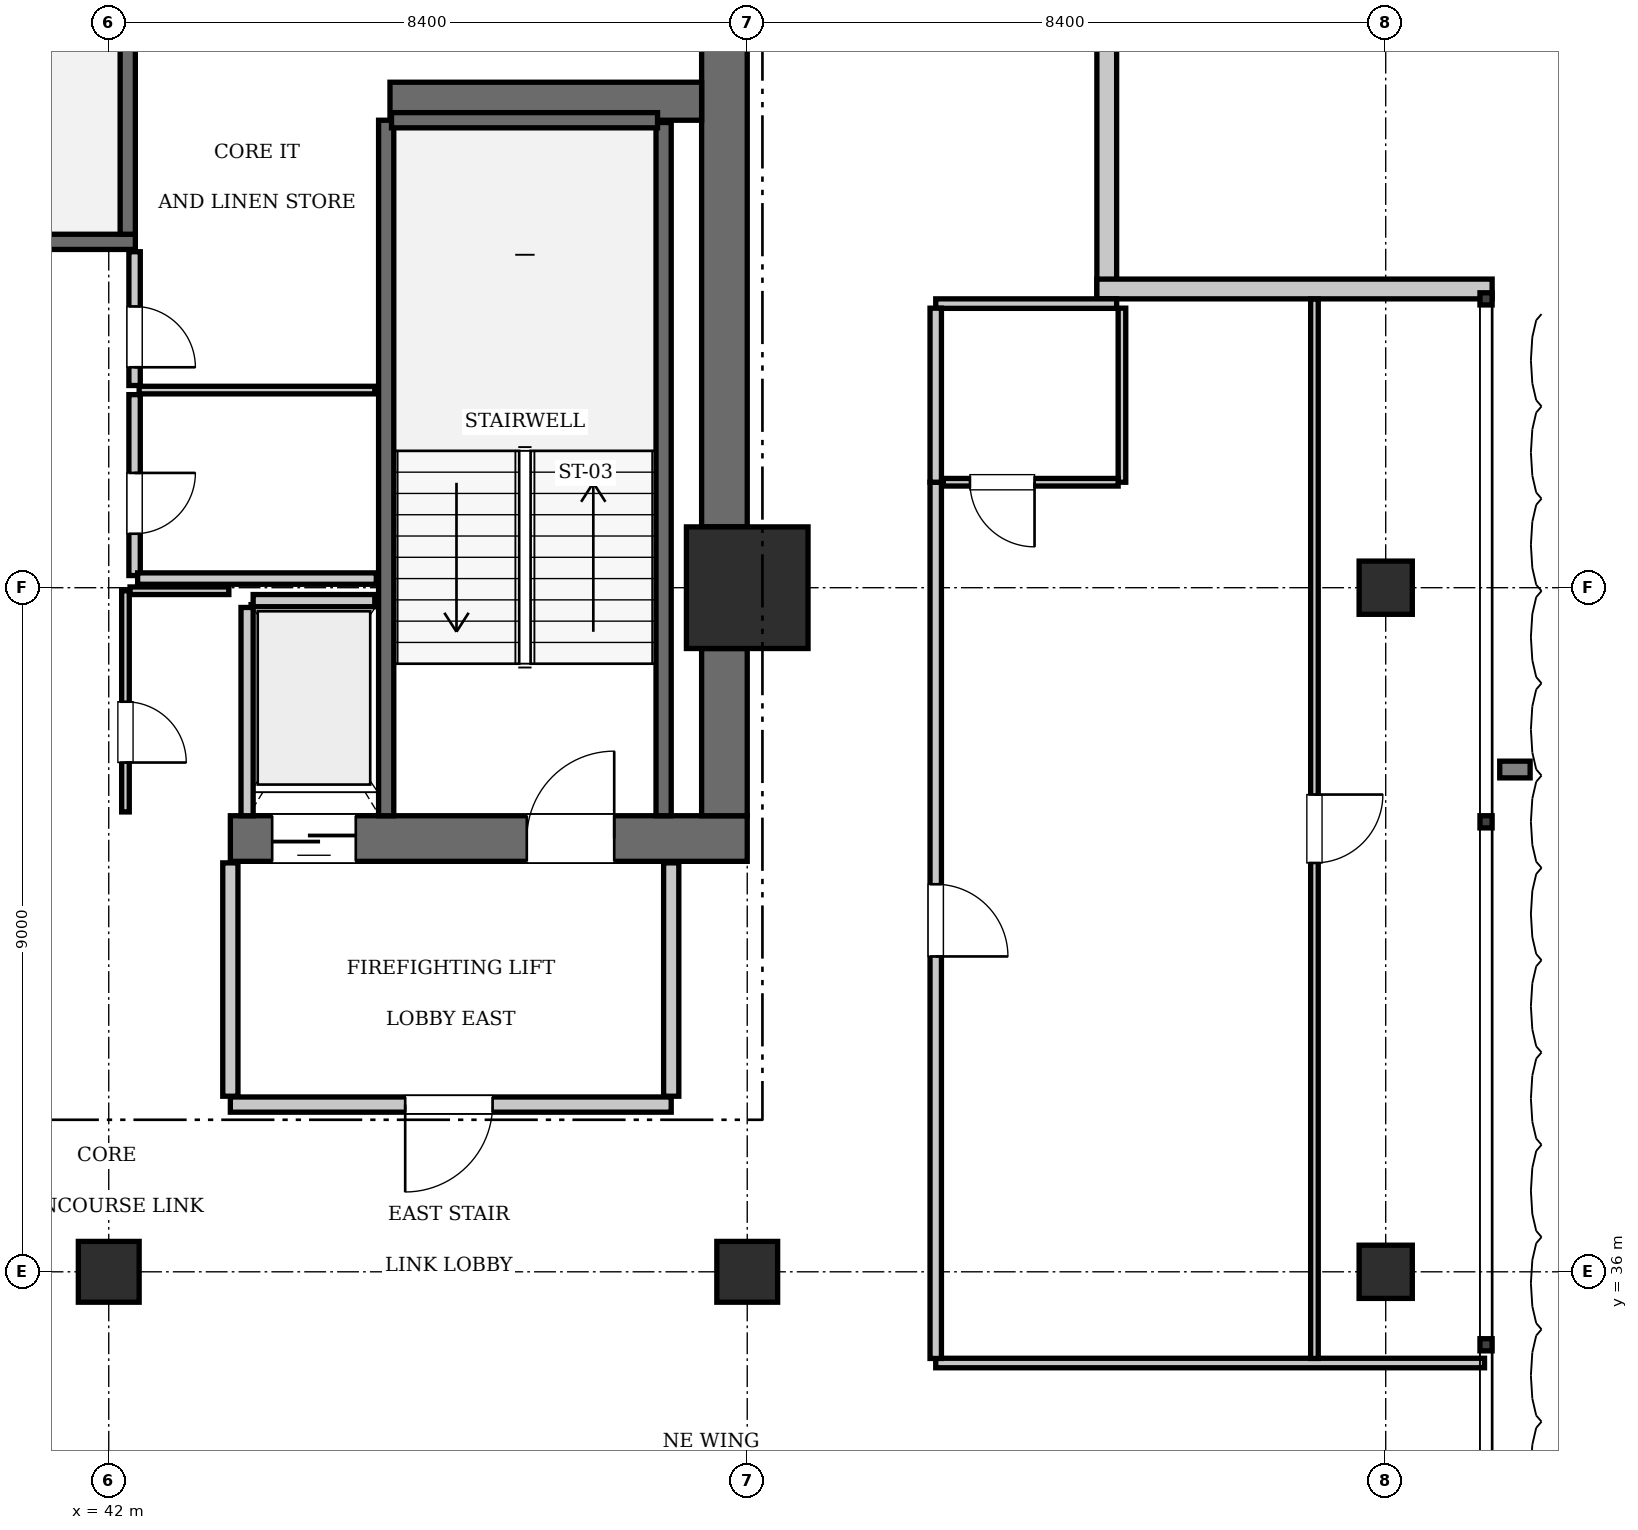
"""IFC4 building model, lengths in metres.
Left out: names, types, materials, properties, quantities, classifications, styles, units other than length and angle.
Written with IfcOpenShell. Run it as: python <this file> out.ifc"""

import sys

from ifc_helpers import new_model, si_unit, direction, frame, frame_2d, origin, origin_2d, place, context, subcontext, project, spatial, rectangle, extrude, element, fill, save


model = new_model("IFC4")
c1 = context("Model", 3, precision=1e-05, world=origin(), true_north=direction((0.0, 1.0)))
c2 = subcontext(c1, "Body", "Model", "MODEL_VIEW")
j1 = project(units=[si_unit("LENGTHUNIT", "METRE"), si_unit("PLANEANGLEUNIT", "RADIAN")], contexts=[c1])
p1 = place(None, origin())
s1 = spatial("IfcSite", under=j1, at=p1, CompositionType="ELEMENT")
p2 = place(p1, origin())
s2 = spatial("IfcBuilding", under=s1, at=p2, CompositionType="ELEMENT")
p3 = place(p2, frame((0.0, 0.0, 277.9)))
s3 = spatial("IfcBuildingStorey", under=s2, at=p3, CompositionType="ELEMENT", Elevation=277.9)
p4 = place(p3, frame((50.4, 45.0, 0.0), z_axis=(0.0, 0.0, 1.0), x_axis=(1.0, 0.0, 0.0)))
e1 = element("IfcColumn", 1, at=p4, inside=s3, PredefinedType="COLUMN", context=c2, shape_type="SweptSolid", body=[
    extrude(rectangle(XDim=1.6, YDim=1.6, at=origin_2d()), origin(), (0.0, 0.0, 1.0), 3.85),
])
p5 = place(p3, frame((43.6, 41.7, 0.0), z_axis=(0.0, 0.0, 1.0), x_axis=(1.0, 0.0, 0.0)))
e2 = element("IfcWall", 2, at=p5, inside=s3, PredefinedType="SHEAR", context=c2, shape_type="SweptSolid", body=[
    extrude(rectangle(XDim=6.8, YDim=0.6, at=frame_2d((3.4, 0.0))), origin(), (0.0, 0.0, 1.0), 3.85),
])
p6 = place(p5, frame((3.9, 0.0, 0.0)))
e3 = element("IfcOpeningElement", 3, at=p6, cuts=e2, PredefinedType="OPENING", context=c2, shape_type="SweptSolid", body=[
    extrude(rectangle(XDim=1.15, YDim=2.15, at=frame_2d((0.575, 1.075))), frame((0.0, 0.31, 0.0), z_axis=(0.0, -1.0, 0.0), x_axis=(1.0, 0.0, 0.0)), (0.0, 0.0, 1.0), 0.62),
])
p7 = place(p5, frame((0.55, 0.0, 0.0)))
e4 = element("IfcOpeningElement", 4, at=p7, cuts=e2, PredefinedType="OPENING", context=c2, shape_type="SweptSolid", body=[
    extrude(rectangle(XDim=1.1, YDim=2.2, at=frame_2d((0.55, 1.1))), frame((0.0, 0.31, 0.0), z_axis=(0.0, -1.0, 0.0), x_axis=(1.0, 0.0, 0.0)), (0.0, 0.0, 1.0), 0.62),
])
p8 = place(p3, frame((50.1, 42.0, 0.0), z_axis=(0.0, 0.0, 1.0), x_axis=(0.0, 1.0, 0.0)))
e5 = element("IfcWall", 5, at=p8, inside=s3, PredefinedType="SHEAR", context=c2, shape_type="SweptSolid", body=[
    extrude(rectangle(XDim=2.2, YDim=0.6, at=frame_2d((1.1, 0.0))), origin(), (0.0, 0.0, 1.0), 3.85),
])
p9 = place(p3, frame((50.1, 45.8, 0.0), z_axis=(0.0, 0.0, 1.0), x_axis=(0.0, 1.0, 0.0)))
e6 = element("IfcWall", 6, at=p9, inside=s3, PredefinedType="SHEAR", context=c2, shape_type="SweptSolid", body=[
    extrude(rectangle(XDim=7.6, YDim=0.6, at=frame_2d((3.8, 0.0))), origin(), (0.0, 0.0, 1.0), 3.85),
])
p10 = place(p3, frame((45.7, 51.4, 0.0), z_axis=(0.0, 0.0, 1.0), x_axis=(1.0, 0.0, 0.0)))
e7 = element("IfcWall", 7, at=p10, inside=s3, PredefinedType="SHEAR", context=c2, shape_type="SweptSolid", body=[
    extrude(rectangle(XDim=4.1, YDim=0.5, at=frame_2d((2.05, 0.0))), origin(), (0.0, 0.0, 1.0), 3.85),
])
for number, where, z_axis, x_axis in (
    (8, (42.0, 36.0, 0.0), (0.0, 0.0, 1.0), (1.0, 0.0, 0.0)),
    (9, (50.4, 36.0, 0.0), (0.0, 0.0, 1.0), (1.0, 0.0, 0.0)),
):
    element("IfcColumn", number, at=place(p3, frame(where, z_axis=z_axis, x_axis=x_axis)), inside=s3, PredefinedType="COLUMN", context=c2, shape_type="SweptSolid", body=[
        extrude(rectangle(XDim=0.8, YDim=0.8, at=origin_2d()), origin(), (0.0, 0.0, 1.0), 3.85),
    ])
for number, where, z_axis, x_axis in (
    (10, (58.8, 36.0, 0.0), (0.0, 0.0, 1.0), (1.0, 0.0, 0.0)),
    (11, (58.8, 45.0, 0.0), (0.0, 0.0, 1.0), (1.0, 0.0, 0.0)),
):
    element("IfcColumn", number, at=place(p3, frame(where, z_axis=z_axis, x_axis=x_axis)), inside=s3, PredefinedType="COLUMN", context=c2, shape_type="SweptSolid", body=[
        extrude(rectangle(XDim=0.7, YDim=0.7, at=origin_2d()), origin(), (0.0, 0.0, 1.0), 3.85),
    ])
p11 = place(p3, frame((33.25, 49.55, 0.0), z_axis=(0.0, 0.0, 1.0), x_axis=(1.0, 0.0, 0.0)))
e12 = element("IfcWall", 12, at=p11, inside=s3, PredefinedType="SOLIDWALL", context=c2, shape_type="SweptSolid", body=[
    extrude(rectangle(XDim=9.1, YDim=0.2, at=frame_2d((4.55, 0.0))), origin(), (0.0, 0.0, 1.0), 3.61),
])
p12 = place(p3, frame((42.25, 49.65, 0.0), z_axis=(0.0, 0.0, 1.0), x_axis=(0.0, 1.0, 0.0)))
e13 = element("IfcWall", 13, at=p12, inside=s3, PredefinedType="SOLIDWALL", context=c2, shape_type="SweptSolid", body=[
    extrude(rectangle(XDim=3.75, YDim=0.2, at=frame_2d((1.875, 0.0))), origin(), (0.0, 0.0, 1.0), 3.61),
])
p13 = place(p3, frame((45.65, 42.0, 0.0), z_axis=(0.0, 0.0, 1.0), x_axis=(0.0, 1.0, 0.0)))
e14 = element("IfcWall", 14, at=p13, inside=s3, PredefinedType="SOLIDWALL", context=c2, shape_type="SweptSolid", body=[
    extrude(rectangle(XDim=9.15, YDim=0.2, at=frame_2d((4.575, 0.0))), origin(), (0.0, 0.0, 1.0), 3.61),
])
p14 = place(p3, frame((49.3, 42.0, 0.0), z_axis=(0.0, 0.0, 1.0), x_axis=(0.0, 1.0, 0.0)))
e15 = element("IfcWall", 15, at=p14, inside=s3, PredefinedType="SOLIDWALL", context=c2, shape_type="SweptSolid", body=[
    extrude(rectangle(XDim=9.12, YDim=0.2, at=frame_2d((4.56, 0.0))), origin(), (0.0, 0.0, 1.0), 3.61),
])
p15 = place(p3, frame((45.72, 51.15, 0.0), z_axis=(0.0, 0.0, 1.0), x_axis=(1.0, 0.0, 0.0)))
e16 = element("IfcWall", 16, at=p15, inside=s3, PredefinedType="SOLIDWALL", context=c2, shape_type="SweptSolid", body=[
    extrude(rectangle(XDim=3.5, YDim=0.2, at=frame_2d((1.75, 0.0))), origin(), (0.0, 0.0, 1.0), 3.61),
])
p16 = place(p3, frame((43.9, 44.83, 0.0), z_axis=(0.0, 0.0, 1.0), x_axis=(1.0, 0.0, 0.0)))
e17 = element("IfcWall", 17, at=p16, inside=s3, PredefinedType="SOLIDWALL", context=c2, shape_type="SweptSolid", body=[
    extrude(rectangle(XDim=1.6, YDim=0.16, at=frame_2d((0.8, 0.0))), origin(), (0.0, 0.0, 1.0), 3.61),
])
p17 = place(p3, frame((43.82, 42.0, 0.0), z_axis=(0.0, 0.0, 1.0), x_axis=(0.0, 1.0, 0.0)))
e18 = element("IfcWall", 18, at=p17, inside=s3, PredefinedType="SOLIDWALL", context=c2, shape_type="SweptSolid", body=[
    extrude(rectangle(XDim=2.74, YDim=0.16, at=frame_2d((1.37, 0.0))), origin(), (0.0, 0.0, 1.0), 3.61),
])
for number, where, z_axis, x_axis in (
    (19, (55.13, 54.0, 0.0), (0.0, 0.0, 1.0), (0.0, -1.0, 0.0)),
    (20, (55.0, 48.93, 0.0), (0.0, 0.0, 1.0), (1.0, 0.0, 0.0)),
):
    element("IfcWall", number, at=place(p3, frame(where, z_axis=z_axis, x_axis=x_axis)), inside=s3, PredefinedType="SOLIDWALL", context=c2, shape_type="SweptSolid", body=[
        extrude(rectangle(XDim=5.2, YDim=0.26, at=frame_2d((2.6, 0.0))), origin(), (0.0, 0.0, 1.0), 3.61),
    ])
p18 = place(p3, frame((43.6, 38.2, 0.0), z_axis=(0.0, 0.0, 1.0), x_axis=(1.0, 0.0, 0.0)))
e21 = element("IfcWall", 21, at=p18, inside=s3, PredefinedType="PARTITIONING", context=c2, shape_type="SweptSolid", body=[
    extrude(rectangle(XDim=5.8, YDim=0.2, at=frame_2d((2.9, 0.0))), origin(), (0.0, 0.0, 1.0), 3.61),
])
p19 = place(p18, frame((2.3, 0.0, 0.0)))
e22 = element("IfcOpeningElement", 22, at=p19, cuts=e21, PredefinedType="OPENING", context=c2, shape_type="SweptSolid", body=[
    extrude(rectangle(XDim=1.15, YDim=2.15, at=frame_2d((0.575, 1.075))), frame((0.0, 0.11, 0.0), z_axis=(0.0, -1.0, 0.0), x_axis=(1.0, 0.0, 0.0)), (0.0, 0.0, 1.0), 0.22),
])
for number, where, z_axis, x_axis in (
    (23, (43.6, 38.31, 0.0), (0.0, 0.0, 1.0), (0.0, 1.0, 0.0)),
    (24, (49.4, 38.31, 0.0), (0.0, 0.0, 1.0), (0.0, 1.0, 0.0)),
):
    element("IfcWall", number, at=place(p3, frame(where, z_axis=z_axis, x_axis=x_axis)), inside=s3, PredefinedType="PARTITIONING", context=c2, shape_type="SweptSolid", body=[
        extrude(rectangle(XDim=3.07, YDim=0.2, at=frame_2d((1.535, 0.0))), origin(), (0.0, 0.0, 1.0), 3.61),
    ])
p20 = place(p3, frame((42.22, 42.05, 0.0), z_axis=(0.0, 0.0, 1.0), x_axis=(0.0, 1.0, 0.0)))
e25 = element("IfcWall", 25, at=p20, inside=s3, PredefinedType="PARTITIONING", context=c2, shape_type="SweptSolid", body=[
    extrude(rectangle(XDim=2.91, YDim=0.1, at=frame_2d((1.455, 0.0))), origin(), (0.0, 0.0, 1.0), 3.61),
])
p21 = place(p20, frame((0.65, 0.0, 0.0)))
e26 = element("IfcOpeningElement", 26, at=p21, cuts=e25, PredefinedType="OPENING", context=c2, shape_type="SweptSolid", body=[
    extrude(rectangle(XDim=0.8, YDim=2.05, at=frame_2d((0.4, 1.025))), frame((0.0, 0.06, 0.0), z_axis=(0.0, -1.0, 0.0), x_axis=(1.0, 0.0, 0.0)), (0.0, 0.0, 1.0), 0.12),
])
p22 = place(p3, frame((42.28, 44.96, 0.0), z_axis=(0.0, 0.0, 1.0), x_axis=(1.0, 0.0, 0.0)))
e27 = element("IfcWall", 27, at=p22, inside=s3, PredefinedType="PARTITIONING", context=c2, shape_type="SweptSolid", body=[
    extrude(rectangle(XDim=1.3, YDim=0.1, at=frame_2d((0.65, 0.0))), origin(), (0.0, 0.0, 1.0), 3.61),
])
p23 = place(p3, frame((42.34, 45.16, 0.0), z_axis=(0.0, 0.0, 1.0), x_axis=(0.0, 1.0, 0.0)))
e28 = element("IfcWall", 28, at=p23, inside=s3, PredefinedType="PARTITIONING", context=c2, shape_type="SweptSolid", body=[
    extrude(rectangle(XDim=2.38, YDim=0.15, at=frame_2d((1.19, 0.0))), origin(), (0.0, 0.0, 1.0), 3.61),
])
p24 = place(p23, frame((0.55, 0.0, 0.0)))
e29 = element("IfcOpeningElement", 29, at=p24, cuts=e28, PredefinedType="OPENING", context=c2, shape_type="SweptSolid", body=[
    extrude(rectangle(XDim=0.8, YDim=2.05, at=frame_2d((0.4, 1.025))), frame((0.0, 0.085, 0.0), z_axis=(0.0, -1.0, 0.0), x_axis=(1.0, 0.0, 0.0)), (0.0, 0.0, 1.0), 0.17),
])
p25 = place(p3, frame((42.34, 47.66, 0.0), z_axis=(0.0, 0.0, 1.0), x_axis=(0.0, 1.0, 0.0)))
e30 = element("IfcWall", 30, at=p25, inside=s3, PredefinedType="PARTITIONING", context=c2, shape_type="SweptSolid", body=[
    extrude(rectangle(XDim=1.76, YDim=0.15, at=frame_2d((0.88, 0.0))), origin(), (0.0, 0.0, 1.0), 3.61),
])
p26 = place(p25, frame((0.24, 0.0, 0.0)))
e31 = element("IfcOpeningElement", 31, at=p26, cuts=e30, PredefinedType="OPENING", context=c2, shape_type="SweptSolid", body=[
    extrude(rectangle(XDim=0.8, YDim=2.05, at=frame_2d((0.4, 1.025))), frame((0.0, 0.085, 0.0), z_axis=(0.0, -1.0, 0.0), x_axis=(1.0, 0.0, 0.0)), (0.0, 0.0, 1.0), 0.17),
])
p27 = place(p3, frame((42.4, 47.6, 0.0), z_axis=(0.0, 0.0, 1.0), x_axis=(1.0, 0.0, 0.0)))
e32 = element("IfcWall", 32, at=p27, inside=s3, PredefinedType="PARTITIONING", context=c2, shape_type="SweptSolid", body=[
    extrude(rectangle(XDim=3.1, YDim=0.1, at=frame_2d((1.55, 0.0))), origin(), (0.0, 0.0, 1.0), 3.61),
])
p28 = place(p3, frame((42.38, 45.12, 0.0), z_axis=(0.0, 0.0, 1.0), x_axis=(1.0, 0.0, 0.0)))
e33 = element("IfcWall", 33, at=p28, inside=s3, PredefinedType="PARTITIONING", context=c2, shape_type="SweptSolid", body=[
    extrude(rectangle(XDim=3.14, YDim=0.15, at=frame_2d((1.57, 0.0))), origin(), (0.0, 0.0, 1.0), 3.61),
])
p29 = place(p3, frame((52.88, 34.8, 0.0), z_axis=(0.0, 0.0, 1.0), x_axis=(1.0, 0.0, 0.0)))
e34 = element("IfcWall", 34, at=p29, inside=s3, PredefinedType="PARTITIONING", context=c2, shape_type="SweptSolid", body=[
    extrude(rectangle(XDim=7.22, YDim=0.125, at=frame_2d((3.61, 0.0))), origin(), (0.0, 0.0, 1.0), 3.61),
])
p30 = place(p3, frame((52.88, 48.738, 0.0), z_axis=(0.0, 0.0, 1.0), x_axis=(1.0, 0.0, 0.0)))
e35 = element("IfcWall", 35, at=p30, inside=s3, PredefinedType="PARTITIONING", context=c2, shape_type="SweptSolid", body=[
    extrude(rectangle(XDim=2.38, YDim=0.125, at=frame_2d((1.19, 0.0))), origin(), (0.0, 0.0, 1.0), 3.61),
])
p31 = place(p3, frame((52.88, 34.86, 0.0), z_axis=(0.0, 0.0, 1.0), x_axis=(0.0, 1.0, 0.0)))
e36 = element("IfcWall", 36, at=p31, inside=s3, PredefinedType="PARTITIONING", context=c2, shape_type="SweptSolid", body=[
    extrude(rectangle(XDim=11.527, YDim=0.15, at=frame_2d((5.764, 0.0))), origin(), (0.0, 0.0, 1.0), 3.61),
])
p32 = place(p31, frame((5.289, 0.0, 0.0)))
e37 = element("IfcOpeningElement", 37, at=p32, cuts=e36, PredefinedType="OPENING", context=c2, shape_type="SweptSolid", body=[
    extrude(rectangle(XDim=0.95, YDim=2.15, at=frame_2d((0.475, 1.075))), frame((0.0, 0.085, 0.0), z_axis=(0.0, -1.0, 0.0), x_axis=(1.0, 0.0, 0.0)), (0.0, 0.0, 1.0), 0.17),
])
p33 = place(p3, frame((52.88, 46.387, 0.0), z_axis=(0.0, 0.0, 1.0), x_axis=(0.0, 1.0, 0.0)))
e38 = element("IfcWall", 38, at=p33, inside=s3, PredefinedType="PARTITIONING", context=c2, shape_type="SweptSolid", body=[
    extrude(rectangle(XDim=2.29, YDim=0.15, at=frame_2d((1.145, 0.0))), origin(), (0.0, 0.0, 1.0), 3.61),
])
p34 = place(p3, frame((55.33, 46.387, 0.0), z_axis=(0.0, 0.0, 1.0), x_axis=(0.0, 1.0, 0.0)))
e39 = element("IfcWall", 39, at=p34, inside=s3, PredefinedType="PARTITIONING", context=c2, shape_type="SweptSolid", body=[
    extrude(rectangle(XDim=2.29, YDim=0.1, at=frame_2d((1.145, 0.0))), origin(), (0.0, 0.0, 1.0), 3.61),
])
p35 = place(p3, frame((52.98, 46.387, 0.0), z_axis=(0.0, 0.0, 1.0), x_axis=(1.0, 0.0, 0.0)))
e40 = element("IfcWall", 40, at=p35, inside=s3, PredefinedType="PARTITIONING", context=c2, shape_type="SweptSolid", body=[
    extrude(rectangle(XDim=2.3, YDim=0.1, at=frame_2d((1.15, 0.0))), origin(), (0.0, 0.0, 1.0), 3.61),
])
p36 = place(p35, frame((0.35, 0.0, 0.0)))
e41 = element("IfcOpeningElement", 41, at=p36, cuts=e40, PredefinedType="OPENING", context=c2, shape_type="SweptSolid", body=[
    extrude(rectangle(XDim=0.85, YDim=2.1, at=frame_2d((0.425, 1.05))), frame((0.0, 0.06, 0.0), z_axis=(0.0, -1.0, 0.0), x_axis=(1.0, 0.0, 0.0)), (0.0, 0.0, 1.0), 0.12),
])
p37 = place(p3, frame((57.862, 34.86, 0.0), z_axis=(0.0, 0.0, 1.0), x_axis=(0.0, 1.0, 0.0)))
e42 = element("IfcWall", 42, at=p37, inside=s3, PredefinedType="PARTITIONING", context=c2, shape_type="SweptSolid", body=[
    extrude(rectangle(XDim=13.938, YDim=0.1, at=frame_2d((6.969, 0.0))), origin(), (0.0, 0.0, 1.0), 3.61),
])
p38 = place(p37, frame((6.519, 0.0, 0.0)))
e43 = element("IfcOpeningElement", 43, at=p38, cuts=e42, PredefinedType="OPENING", context=c2, shape_type="SweptSolid", body=[
    extrude(rectangle(XDim=0.9, YDim=2.1, at=frame_2d((0.45, 1.05))), frame((0.0, 0.06, 0.0), z_axis=(0.0, -1.0, 0.0), x_axis=(1.0, 0.0, 0.0)), (0.0, 0.0, 1.0), 0.12),
])
p39 = place(p6, origin())
e44 = element("IfcDoor", 44, at=p39, inside=s3, OperationType="SINGLE_SWING_RIGHT", PredefinedType="DOOR", context=c2, shape_type="SweptSolid", body=[
    extrude(rectangle(XDim=1.15, YDim=2.15, at=frame_2d((0.575, 1.075))), frame((0.0, 0.025, 0.0), z_axis=(0.0, -1.0, 0.0), x_axis=(1.0, 0.0, 0.0)), (0.0, 0.0, 1.0), 0.05),
])
fill(e3, e44)
p40 = place(p7, frame((1.1, 0.0, 0.0), z_axis=(0.0, 0.0, 1.0), x_axis=(-1.0, 0.0, 0.0)))
e45 = element("IfcDoor", 45, at=p40, inside=s3, OperationType="SLIDING_TO_LEFT", PredefinedType="DOOR", context=c2, shape_type="SweptSolid", body=[
    extrude(rectangle(XDim=1.1, YDim=2.2, at=frame_2d((0.55, 1.1))), frame((0.0, 0.025, 0.0), z_axis=(0.0, -1.0, 0.0), x_axis=(1.0, 0.0, 0.0)), (0.0, 0.0, 1.0), 0.05),
])
fill(e4, e45)
p41 = place(p19, frame((1.15, 0.0, 0.0), z_axis=(0.0, 0.0, 1.0), x_axis=(-1.0, 0.0, 0.0)))
e46 = element("IfcDoor", 46, at=p41, inside=s3, OperationType="SINGLE_SWING_RIGHT", PredefinedType="DOOR", context=c2, shape_type="SweptSolid", body=[
    extrude(rectangle(XDim=1.15, YDim=2.15, at=frame_2d((0.575, 1.075))), frame((0.0, 0.025, 0.0), z_axis=(0.0, -1.0, 0.0), x_axis=(1.0, 0.0, 0.0)), (0.0, 0.0, 1.0), 0.05),
])
fill(e22, e46)
p42 = place(p21, frame((0.8, 0.0, 0.0), z_axis=(0.0, 0.0, 1.0), x_axis=(-1.0, 0.0, 0.0)))
e47 = element("IfcDoor", 47, at=p42, inside=s3, OperationType="SINGLE_SWING_RIGHT", PredefinedType="DOOR", context=c2, shape_type="SweptSolid", body=[
    extrude(rectangle(XDim=0.8, YDim=2.05, at=frame_2d((0.4, 1.025))), frame((0.0, 0.025, 0.0), z_axis=(0.0, -1.0, 0.0), x_axis=(1.0, 0.0, 0.0)), (0.0, 0.0, 1.0), 0.05),
])
fill(e26, e47)
p43 = place(p24, frame((0.8, 0.0, 0.0), z_axis=(0.0, 0.0, 1.0), x_axis=(-1.0, 0.0, 0.0)))
e48 = element("IfcDoor", 48, at=p43, inside=s3, OperationType="SINGLE_SWING_LEFT", PredefinedType="DOOR", context=c2, shape_type="SweptSolid", body=[
    extrude(rectangle(XDim=0.8, YDim=2.05, at=frame_2d((0.4, 1.025))), frame((0.0, 0.025, 0.0), z_axis=(0.0, -1.0, 0.0), x_axis=(1.0, 0.0, 0.0)), (0.0, 0.0, 1.0), 0.05),
])
fill(e29, e48)
p44 = place(p26, frame((0.8, 0.0, 0.0), z_axis=(0.0, 0.0, 1.0), x_axis=(-1.0, 0.0, 0.0)))
e49 = element("IfcDoor", 49, at=p44, inside=s3, OperationType="SINGLE_SWING_RIGHT", PredefinedType="DOOR", context=c2, shape_type="SweptSolid", body=[
    extrude(rectangle(XDim=0.8, YDim=2.05, at=frame_2d((0.4, 1.025))), frame((0.0, 0.025, 0.0), z_axis=(0.0, -1.0, 0.0), x_axis=(1.0, 0.0, 0.0)), (0.0, 0.0, 1.0), 0.05),
])
fill(e31, e49)
p45 = place(p36, frame((0.85, 0.0, 0.0), z_axis=(0.0, 0.0, 1.0), x_axis=(-1.0, 0.0, 0.0)))
e50 = element("IfcDoor", 50, at=p45, inside=s3, OperationType="SINGLE_SWING_LEFT", PredefinedType="DOOR", context=c2, shape_type="SweptSolid", body=[
    extrude(rectangle(XDim=0.85, YDim=2.1, at=frame_2d((0.425, 1.05))), frame((0.0, 0.025, 0.0), z_axis=(0.0, -1.0, 0.0), x_axis=(1.0, 0.0, 0.0)), (0.0, 0.0, 1.0), 0.05),
])
fill(e41, e50)
p46 = place(p32, frame((0.95, 0.0, 0.0), z_axis=(0.0, 0.0, 1.0), x_axis=(-1.0, 0.0, 0.0)))
e51 = element("IfcDoor", 51, at=p46, inside=s3, OperationType="SINGLE_SWING_RIGHT", PredefinedType="DOOR", context=c2, shape_type="SweptSolid", body=[
    extrude(rectangle(XDim=0.95, YDim=2.15, at=frame_2d((0.475, 1.075))), frame((0.0, 0.025, 0.0), z_axis=(0.0, -1.0, 0.0), x_axis=(1.0, 0.0, 0.0)), (0.0, 0.0, 1.0), 0.05),
])
fill(e37, e51)
p47 = place(p38, frame((0.9, 0.0, 0.0), z_axis=(0.0, 0.0, 1.0), x_axis=(-1.0, 0.0, 0.0)))
e52 = element("IfcDoor", 52, at=p47, inside=s3, OperationType="SINGLE_SWING_LEFT", PredefinedType="DOOR", context=c2, shape_type="SweptSolid", body=[
    extrude(rectangle(XDim=0.9, YDim=2.1, at=frame_2d((0.45, 1.05))), frame((0.0, 0.025, 0.0), z_axis=(0.0, -1.0, 0.0), x_axis=(1.0, 0.0, 0.0)), (0.0, 0.0, 1.0), 0.05),
])
fill(e43, e52)
save(model, sys.argv[1])
